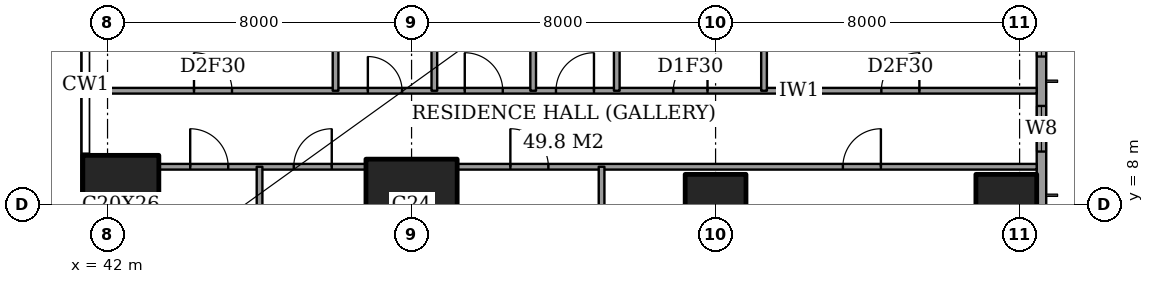
"""IFC4 building model, lengths in metres.
Left out: names, types, materials, properties, quantities, classifications, styles, units other than length and angle.
Written with IfcOpenShell. Run it as: python <this file> out.ifc"""

import sys

from ifc_helpers import new_model, si_unit, direction, frame, frame_2d, origin, origin_2d, place, context, subcontext, project, spatial, rectangle, extrude, element, fill, save


model = new_model("IFC4")
c1 = context("Model", 3, precision=1e-05, world=origin(), true_north=direction((0.0, 1.0)))
c2 = subcontext(c1, "Body", "Model", "MODEL_VIEW")
j1 = project(units=[si_unit("LENGTHUNIT", "METRE"), si_unit("PLANEANGLEUNIT", "RADIAN")], contexts=[c1])
p1 = place(None, origin())
s1 = spatial("IfcSite", under=j1, at=p1, CompositionType="ELEMENT")
p2 = place(p1, origin())
s2 = spatial("IfcBuilding", under=s1, at=p2, CompositionType="ELEMENT")
p3 = place(p2, frame((0.0, 0.0, 234.0)))
s3 = spatial("IfcBuildingStorey", under=s2, at=p3, CompositionType="ELEMENT", Elevation=234.0)
p4 = place(p3, frame((42.35, 8.0, 0.0), z_axis=(0.0, 0.0, 1.0), x_axis=(1.0, 0.0, 0.0)))
e1 = element("IfcColumn", 1, at=p4, inside=s3, PredefinedType="COLUMN", context=c2, shape_type="SweptSolid", body=[
    extrude(rectangle(XDim=2.0, YDim=2.6, at=origin_2d()), origin(), (0.0, 0.0, 1.0), 3.6),
])
p5 = place(p3, frame((50.0, 8.0, 0.0), z_axis=(0.0, 0.0, 1.0), x_axis=(1.0, 0.0, 0.0)))
e2 = element("IfcColumn", 2, at=p5, inside=s3, PredefinedType="COLUMN", context=c2, shape_type="SweptSolid", body=[
    extrude(rectangle(XDim=2.4, YDim=2.4, at=origin_2d()), origin(), (0.0, 0.0, 1.0), 3.6),
])
for number, where, z_axis, x_axis in (
    (3, (58.0, 8.0, 0.0), (0.0, 0.0, 1.0), (1.0, 0.0, 0.0)),
    (4, (65.65, 8.0, 0.0), (0.0, 0.0, 1.0), (1.0, 0.0, 0.0)),
):
    element("IfcColumn", number, at=place(p3, frame(where, z_axis=z_axis, x_axis=x_axis)), inside=s3, PredefinedType="COLUMN", context=c2, shape_type="SweptSolid", body=[
        extrude(rectangle(XDim=1.6, YDim=1.6, at=origin_2d()), origin(), (0.0, 0.0, 1.0), 3.6),
    ])
p6 = place(p3, frame((66.575, 3.175, 0.0), z_axis=(0.0, 0.0, 1.0), x_axis=(0.0, 1.0, 0.0)))
e5 = element("IfcWall", 5, at=p6, inside=s3, PredefinedType="SOLIDWALL", context=c2, shape_type="SweptSolid", body=[
    extrude(rectangle(XDim=41.65, YDim=0.25, at=frame_2d((20.825, 0.0))), origin(), (0.0, 0.0, 1.0), 3.6),
])
p7 = place(p6, frame((0.875, 0.0, 0.6)))
e6 = element("IfcOpeningElement", 6, at=p7, cuts=e5, PredefinedType="OPENING", context=c2, shape_type="SweptSolid", body=[
    extrude(rectangle(XDim=2.4, YDim=2.0, at=frame_2d((1.2, 1.0))), frame((0.0, 0.135, 0.0), z_axis=(0.0, -1.0, 0.0), x_axis=(1.0, 0.0, 0.0)), (0.0, 0.0, 1.0), 0.27),
])
p8 = place(p6, frame((6.225, 0.0, 0.6)))
e7 = element("IfcOpeningElement", 7, at=p8, cuts=e5, PredefinedType="OPENING", context=c2, shape_type="SweptSolid", body=[
    extrude(rectangle(XDim=1.2, YDim=2.0, at=frame_2d((0.6, 1.0))), frame((0.0, 0.135, 0.0), z_axis=(0.0, -1.0, 0.0), x_axis=(1.0, 0.0, 0.0)), (0.0, 0.0, 1.0), 0.27),
])
p9 = place(p6, frame((8.725, 0.0, 0.6)))
e8 = element("IfcOpeningElement", 8, at=p9, cuts=e5, PredefinedType="OPENING", context=c2, shape_type="SweptSolid", body=[
    extrude(rectangle(XDim=2.4, YDim=2.0, at=frame_2d((1.2, 1.0))), frame((0.0, 0.135, 0.0), z_axis=(0.0, -1.0, 0.0), x_axis=(1.0, 0.0, 0.0)), (0.0, 0.0, 1.0), 0.27),
])
p10 = place(p6, frame((15.725, 0.0, 0.6)))
e9 = element("IfcOpeningElement", 9, at=p10, cuts=e5, PredefinedType="OPENING", context=c2, shape_type="SweptSolid", body=[
    extrude(rectangle(XDim=2.4, YDim=2.0, at=frame_2d((1.2, 1.0))), frame((0.0, 0.135, 0.0), z_axis=(0.0, -1.0, 0.0), x_axis=(1.0, 0.0, 0.0)), (0.0, 0.0, 1.0), 0.27),
])
p11 = place(p6, frame((23.525, 0.0, 0.6)))
e10 = element("IfcOpeningElement", 10, at=p11, cuts=e5, PredefinedType="OPENING", context=c2, shape_type="SweptSolid", body=[
    extrude(rectangle(XDim=2.4, YDim=2.0, at=frame_2d((1.2, 1.0))), frame((0.0, 0.135, 0.0), z_axis=(0.0, -1.0, 0.0), x_axis=(1.0, 0.0, 0.0)), (0.0, 0.0, 1.0), 0.27),
])
p12 = place(p6, frame((30.725, 0.0, 0.6)))
e11 = element("IfcOpeningElement", 11, at=p12, cuts=e5, PredefinedType="OPENING", context=c2, shape_type="SweptSolid", body=[
    extrude(rectangle(XDim=2.4, YDim=2.0, at=frame_2d((1.2, 1.0))), frame((0.0, 0.135, 0.0), z_axis=(0.0, -1.0, 0.0), x_axis=(1.0, 0.0, 0.0)), (0.0, 0.0, 1.0), 0.27),
])
p13 = place(p6, frame((34.525, 0.0, 0.6)))
e12 = element("IfcOpeningElement", 12, at=p13, cuts=e5, PredefinedType="OPENING", context=c2, shape_type="SweptSolid", body=[
    extrude(rectangle(XDim=1.2, YDim=2.0, at=frame_2d((0.6, 1.0))), frame((0.0, 0.135, 0.0), z_axis=(0.0, -1.0, 0.0), x_axis=(1.0, 0.0, 0.0)), (0.0, 0.0, 1.0), 0.27),
])
p14 = place(p6, frame((38.375, 0.0, 0.6)))
e13 = element("IfcOpeningElement", 13, at=p14, cuts=e5, PredefinedType="OPENING", context=c2, shape_type="SweptSolid", body=[
    extrude(rectangle(XDim=2.4, YDim=2.0, at=frame_2d((1.2, 1.0))), frame((0.0, 0.135, 0.0), z_axis=(0.0, -1.0, 0.0), x_axis=(1.0, 0.0, 0.0)), (0.0, 0.0, 1.0), 0.27),
])
p15 = place(p3, frame((43.35, 9.0, 0.0), z_axis=(0.0, 0.0, 1.0), x_axis=(1.0, 0.0, 0.0)))
e14 = element("IfcWall", 14, at=p15, inside=s3, PredefinedType="PARTITIONING", context=c2, shape_type="SweptSolid", body=[
    extrude(rectangle(XDim=5.45, YDim=0.15, at=frame_2d((2.725, 0.0))), origin(), (0.0, 0.0, 1.0), 3.35),
])
p16 = place(p15, frame((3.55, 0.0, 0.0)))
e15 = element("IfcOpeningElement", 15, at=p16, cuts=e14, PredefinedType="OPENING", context=c2, shape_type="SweptSolid", body=[
    extrude(rectangle(XDim=1.0, YDim=2.1, at=frame_2d((0.5, 1.05))), frame((0.0, 0.085, 0.0), z_axis=(0.0, -1.0, 0.0), x_axis=(1.0, 0.0, 0.0)), (0.0, 0.0, 1.0), 0.17),
])
p17 = place(p15, frame((0.825, 0.0, 0.0)))
e16 = element("IfcOpeningElement", 16, at=p17, cuts=e14, PredefinedType="OPENING", context=c2, shape_type="SweptSolid", body=[
    extrude(rectangle(XDim=1.0, YDim=2.1, at=frame_2d((0.5, 1.05))), frame((0.0, 0.085, 0.0), z_axis=(0.0, -1.0, 0.0), x_axis=(1.0, 0.0, 0.0)), (0.0, 0.0, 1.0), 0.17),
])
p18 = place(p3, frame((51.2, 9.0, 0.0), z_axis=(0.0, 0.0, 1.0), x_axis=(1.0, 0.0, 0.0)))
e17 = element("IfcWall", 17, at=p18, inside=s3, PredefinedType="PARTITIONING", context=c2, shape_type="SweptSolid", body=[
    extrude(rectangle(XDim=15.25, YDim=0.15, at=frame_2d((7.625, 0.0))), origin(), (0.0, 0.0, 1.0), 3.35),
])
p19 = place(p18, frame((10.15, 0.0, 0.0)))
e18 = element("IfcOpeningElement", 18, at=p19, cuts=e17, PredefinedType="OPENING", context=c2, shape_type="SweptSolid", body=[
    extrude(rectangle(XDim=1.0, YDim=2.1, at=frame_2d((0.5, 1.05))), frame((0.0, 0.085, 0.0), z_axis=(0.0, -1.0, 0.0), x_axis=(1.0, 0.0, 0.0)), (0.0, 0.0, 1.0), 0.17),
])
p20 = place(p18, frame((1.4, 0.0, 0.0)))
e19 = element("IfcOpeningElement", 19, at=p20, cuts=e17, PredefinedType="OPENING", context=c2, shape_type="SweptSolid", body=[
    extrude(rectangle(XDim=1.0, YDim=2.1, at=frame_2d((0.5, 1.05))), frame((0.0, 0.085, 0.0), z_axis=(0.0, -1.0, 0.0), x_axis=(1.0, 0.0, 0.0)), (0.0, 0.0, 1.0), 0.17),
])
p21 = place(p3, frame((41.439, 11.0, 0.0), z_axis=(0.0, 0.0, 1.0), x_axis=(1.0, 0.0, 0.0)))
e20 = element("IfcWall", 20, at=p21, inside=s3, PredefinedType="PARTITIONING", context=c2, shape_type="SweptSolid", body=[
    extrude(rectangle(XDim=25.011, YDim=0.15, at=frame_2d((12.505, 0.0))), origin(), (0.0, 0.0, 1.0), 3.35),
])
p22 = place(p21, frame((12.361, 0.0, 0.0)))
e21 = element("IfcOpeningElement", 21, at=p22, cuts=e20, PredefinedType="OPENING", context=c2, shape_type="SweptSolid", body=[
    extrude(rectangle(XDim=1.0, YDim=2.1, at=frame_2d((0.5, 1.05))), frame((0.0, 0.085, 0.0), z_axis=(0.0, -1.0, 0.0), x_axis=(1.0, 0.0, 0.0)), (0.0, 0.0, 1.0), 0.17),
])
p23 = place(p21, frame((20.924, 0.0, 0.0)))
e22 = element("IfcOpeningElement", 22, at=p23, cuts=e20, PredefinedType="OPENING", context=c2, shape_type="SweptSolid", body=[
    extrude(rectangle(XDim=1.0, YDim=2.1, at=frame_2d((0.5, 1.05))), frame((0.0, 0.085, 0.0), z_axis=(0.0, -1.0, 0.0), x_axis=(1.0, 0.0, 0.0)), (0.0, 0.0, 1.0), 0.17),
])
p24 = place(p21, frame((15.448, 0.0, 0.0)))
e23 = element("IfcOpeningElement", 23, at=p24, cuts=e20, PredefinedType="OPENING", context=c2, shape_type="SweptSolid", body=[
    extrude(rectangle(XDim=0.9, YDim=2.1, at=frame_2d((0.45, 1.05))), frame((0.0, 0.085, 0.0), z_axis=(0.0, -1.0, 0.0), x_axis=(1.0, 0.0, 0.0)), (0.0, 0.0, 1.0), 0.17),
])
p25 = place(p21, frame((9.961, 0.0, 0.0)))
e24 = element("IfcOpeningElement", 24, at=p25, cuts=e20, PredefinedType="OPENING", context=c2, shape_type="SweptSolid", body=[
    extrude(rectangle(XDim=1.0, YDim=2.1, at=frame_2d((0.5, 1.05))), frame((0.0, 0.085, 0.0), z_axis=(0.0, -1.0, 0.0), x_axis=(1.0, 0.0, 0.0)), (0.0, 0.0, 1.0), 0.17),
])
p26 = place(p21, frame((7.411, 0.0, 0.0)))
e25 = element("IfcOpeningElement", 25, at=p26, cuts=e20, PredefinedType="OPENING", context=c2, shape_type="SweptSolid", body=[
    extrude(rectangle(XDim=0.9, YDim=2.1, at=frame_2d((0.45, 1.05))), frame((0.0, 0.085, 0.0), z_axis=(0.0, -1.0, 0.0), x_axis=(1.0, 0.0, 0.0)), (0.0, 0.0, 1.0), 0.17),
])
p27 = place(p21, frame((2.836, 0.0, 0.0)))
e26 = element("IfcOpeningElement", 26, at=p27, cuts=e20, PredefinedType="OPENING", context=c2, shape_type="SweptSolid", body=[
    extrude(rectangle(XDim=1.0, YDim=2.1, at=frame_2d((0.5, 1.05))), frame((0.0, 0.085, 0.0), z_axis=(0.0, -1.0, 0.0), x_axis=(1.0, 0.0, 0.0)), (0.0, 0.0, 1.0), 0.17),
])
p28 = place(p3, frame((46.0, -0.45, 0.0), z_axis=(0.0, 0.0, 1.0), x_axis=(0.0, 1.0, 0.0)))
e27 = element("IfcWall", 27, at=p28, inside=s3, PredefinedType="PARTITIONING", context=c2, shape_type="SweptSolid", body=[
    extrude(rectangle(XDim=9.45, YDim=0.15, at=frame_2d((4.725, 0.0))), origin(), (0.0, 0.0, 1.0), 3.35),
])
p29 = place(p3, frame((48.0, 11.0, 0.0), z_axis=(0.0, 0.0, 1.0), x_axis=(0.0, 1.0, 0.0)))
e28 = element("IfcWall", 28, at=p29, inside=s3, PredefinedType="PARTITIONING", context=c2, shape_type="SweptSolid", body=[
    extrude(rectangle(XDim=6.5, YDim=0.15, at=frame_2d((3.25, 0.0))), origin(), (0.0, 0.0, 1.0), 3.35),
])
p30 = place(p3, frame((50.6, 11.0, 0.0), z_axis=(0.0, 0.0, 1.0), x_axis=(0.0, 1.0, 0.0)))
e29 = element("IfcWall", 29, at=p30, inside=s3, PredefinedType="PARTITIONING", context=c2, shape_type="SweptSolid", body=[
    extrude(rectangle(XDim=3.8, YDim=0.15, at=frame_2d((1.9, 0.0))), origin(), (0.0, 0.0, 1.0), 3.35),
])
p31 = place(p3, frame((53.2, 11.0, 0.0), z_axis=(0.0, 0.0, 1.0), x_axis=(0.0, 1.0, 0.0)))
e30 = element("IfcWall", 30, at=p31, inside=s3, PredefinedType="PARTITIONING", context=c2, shape_type="SweptSolid", body=[
    extrude(rectangle(XDim=6.5, YDim=0.15, at=frame_2d((3.25, 0.0))), origin(), (0.0, 0.0, 1.0), 3.35),
])
p32 = place(p3, frame((55.0, -0.45, 0.0), z_axis=(0.0, 0.0, 1.0), x_axis=(0.0, 1.0, 0.0)))
e31 = element("IfcWall", 31, at=p32, inside=s3, PredefinedType="PARTITIONING", context=c2, shape_type="SweptSolid", body=[
    extrude(rectangle(XDim=9.45, YDim=0.15, at=frame_2d((4.725, 0.0))), origin(), (0.0, 0.0, 1.0), 3.35),
])
p33 = place(p3, frame((55.4, 11.0, 0.0), z_axis=(0.0, 0.0, 1.0), x_axis=(0.0, 1.0, 0.0)))
e32 = element("IfcWall", 32, at=p33, inside=s3, PredefinedType="PARTITIONING", context=c2, shape_type="SweptSolid", body=[
    extrude(rectangle(XDim=10.6, YDim=0.15, at=frame_2d((5.3, 0.0))), origin(), (0.0, 0.0, 1.0), 3.35),
])
p34 = place(p33, frame((8.05, 0.0, 0.0)))
e33 = element("IfcOpeningElement", 33, at=p34, cuts=e32, PredefinedType="OPENING", context=c2, shape_type="SweptSolid", body=[
    extrude(rectangle(XDim=1.0, YDim=2.1, at=frame_2d((0.5, 1.05))), frame((0.0, 0.085, 0.0), z_axis=(0.0, -1.0, 0.0), x_axis=(1.0, 0.0, 0.0)), (0.0, 0.0, 1.0), 0.17),
])
p35 = place(p3, frame((59.275, 11.0, 0.0), z_axis=(0.0, 0.0, 1.0), x_axis=(0.0, 1.0, 0.0)))
e34 = element("IfcWall", 34, at=p35, inside=s3, PredefinedType="PARTITIONING", context=c2, shape_type="SweptSolid", body=[
    extrude(rectangle(XDim=3.8, YDim=0.15, at=frame_2d((1.9, 0.0))), origin(), (0.0, 0.0, 1.0), 3.35),
])
p36 = place(p8, origin())
e35 = element("IfcWindow", 35, at=p36, inside=s3, PartitioningType="SINGLE_PANEL", PredefinedType="WINDOW", context=c2, shape_type="SweptSolid", body=[
    extrude(rectangle(XDim=1.2, YDim=2.0, at=frame_2d((0.6, 1.0))), frame((0.0, 0.03, 0.0), z_axis=(0.0, -1.0, 0.0), x_axis=(1.0, 0.0, 0.0)), (0.0, 0.0, 1.0), 0.06),
])
fill(e7, e35)
p37 = place(p9, origin())
e36 = element("IfcWindow", 36, at=p37, inside=s3, PartitioningType="SINGLE_PANEL", PredefinedType="WINDOW", context=c2, shape_type="SweptSolid", body=[
    extrude(rectangle(XDim=2.4, YDim=2.0, at=frame_2d((1.2, 1.0))), frame((0.0, 0.03, 0.0), z_axis=(0.0, -1.0, 0.0), x_axis=(1.0, 0.0, 0.0)), (0.0, 0.0, 1.0), 0.06),
])
fill(e8, e36)
p38 = place(p19, origin())
e37 = element("IfcDoor", 37, at=p38, inside=s3, OperationType="SINGLE_SWING_LEFT", PredefinedType="DOOR", context=c2, shape_type="SweptSolid", body=[
    extrude(rectangle(XDim=1.0, YDim=2.1, at=frame_2d((0.5, 1.05))), frame((0.0, 0.025, 0.0), z_axis=(0.0, -1.0, 0.0), x_axis=(1.0, 0.0, 0.0)), (0.0, 0.0, 1.0), 0.05),
])
fill(e18, e37)
p39 = place(p20, origin())
e38 = element("IfcDoor", 38, at=p39, inside=s3, OperationType="SINGLE_SWING_RIGHT", PredefinedType="DOOR", context=c2, shape_type="SweptSolid", body=[
    extrude(rectangle(XDim=1.0, YDim=2.1, at=frame_2d((0.5, 1.05))), frame((0.0, 0.025, 0.0), z_axis=(0.0, -1.0, 0.0), x_axis=(1.0, 0.0, 0.0)), (0.0, 0.0, 1.0), 0.05),
])
fill(e19, e38)
p40 = place(p16, origin())
e39 = element("IfcDoor", 39, at=p40, inside=s3, OperationType="SINGLE_SWING_LEFT", PredefinedType="DOOR", context=c2, shape_type="SweptSolid", body=[
    extrude(rectangle(XDim=1.0, YDim=2.1, at=frame_2d((0.5, 1.05))), frame((0.0, 0.025, 0.0), z_axis=(0.0, -1.0, 0.0), x_axis=(1.0, 0.0, 0.0)), (0.0, 0.0, 1.0), 0.05),
])
fill(e15, e39)
p41 = place(p17, origin())
e40 = element("IfcDoor", 40, at=p41, inside=s3, OperationType="SINGLE_SWING_RIGHT", PredefinedType="DOOR", context=c2, shape_type="SweptSolid", body=[
    extrude(rectangle(XDim=1.0, YDim=2.1, at=frame_2d((0.5, 1.05))), frame((0.0, 0.025, 0.0), z_axis=(0.0, -1.0, 0.0), x_axis=(1.0, 0.0, 0.0)), (0.0, 0.0, 1.0), 0.05),
])
fill(e16, e40)
p42 = place(p22, origin())
e41 = element("IfcDoor", 41, at=p42, inside=s3, OperationType="SINGLE_SWING_LEFT", PredefinedType="DOOR", context=c2, shape_type="SweptSolid", body=[
    extrude(rectangle(XDim=1.0, YDim=2.1, at=frame_2d((0.5, 1.05))), frame((0.0, 0.025, 0.0), z_axis=(0.0, -1.0, 0.0), x_axis=(1.0, 0.0, 0.0)), (0.0, 0.0, 1.0), 0.05),
])
fill(e21, e41)
p43 = place(p23, origin())
e42 = element("IfcDoor", 42, at=p43, inside=s3, OperationType="SINGLE_SWING_LEFT", PredefinedType="DOOR", context=c2, shape_type="SweptSolid", body=[
    extrude(rectangle(XDim=1.0, YDim=2.1, at=frame_2d((0.5, 1.05))), frame((0.0, 0.025, 0.0), z_axis=(0.0, -1.0, 0.0), x_axis=(1.0, 0.0, 0.0)), (0.0, 0.0, 1.0), 0.05),
])
fill(e22, e42)
p44 = place(p24, origin())
e43 = element("IfcDoor", 43, at=p44, inside=s3, OperationType="SINGLE_SWING_LEFT", PredefinedType="DOOR", context=c2, shape_type="SweptSolid", body=[
    extrude(rectangle(XDim=0.9, YDim=2.1, at=frame_2d((0.45, 1.05))), frame((0.0, 0.025, 0.0), z_axis=(0.0, -1.0, 0.0), x_axis=(1.0, 0.0, 0.0)), (0.0, 0.0, 1.0), 0.05),
])
fill(e23, e43)
p45 = place(p25, origin())
e44 = element("IfcDoor", 44, at=p45, inside=s3, OperationType="SINGLE_SWING_RIGHT", PredefinedType="DOOR", context=c2, shape_type="SweptSolid", body=[
    extrude(rectangle(XDim=1.0, YDim=2.1, at=frame_2d((0.5, 1.05))), frame((0.0, 0.025, 0.0), z_axis=(0.0, -1.0, 0.0), x_axis=(1.0, 0.0, 0.0)), (0.0, 0.0, 1.0), 0.05),
])
fill(e24, e44)
p46 = place(p26, origin())
e45 = element("IfcDoor", 45, at=p46, inside=s3, OperationType="SINGLE_SWING_RIGHT", PredefinedType="DOOR", context=c2, shape_type="SweptSolid", body=[
    extrude(rectangle(XDim=0.9, YDim=2.1, at=frame_2d((0.45, 1.05))), frame((0.0, 0.025, 0.0), z_axis=(0.0, -1.0, 0.0), x_axis=(1.0, 0.0, 0.0)), (0.0, 0.0, 1.0), 0.05),
])
fill(e25, e45)
p47 = place(p27, origin())
e46 = element("IfcDoor", 46, at=p47, inside=s3, OperationType="SINGLE_SWING_RIGHT", PredefinedType="DOOR", context=c2, shape_type="SweptSolid", body=[
    extrude(rectangle(XDim=1.0, YDim=2.1, at=frame_2d((0.5, 1.05))), frame((0.0, 0.025, 0.0), z_axis=(0.0, -1.0, 0.0), x_axis=(1.0, 0.0, 0.0)), (0.0, 0.0, 1.0), 0.05),
])
fill(e26, e46)
save(model, sys.argv[1])
